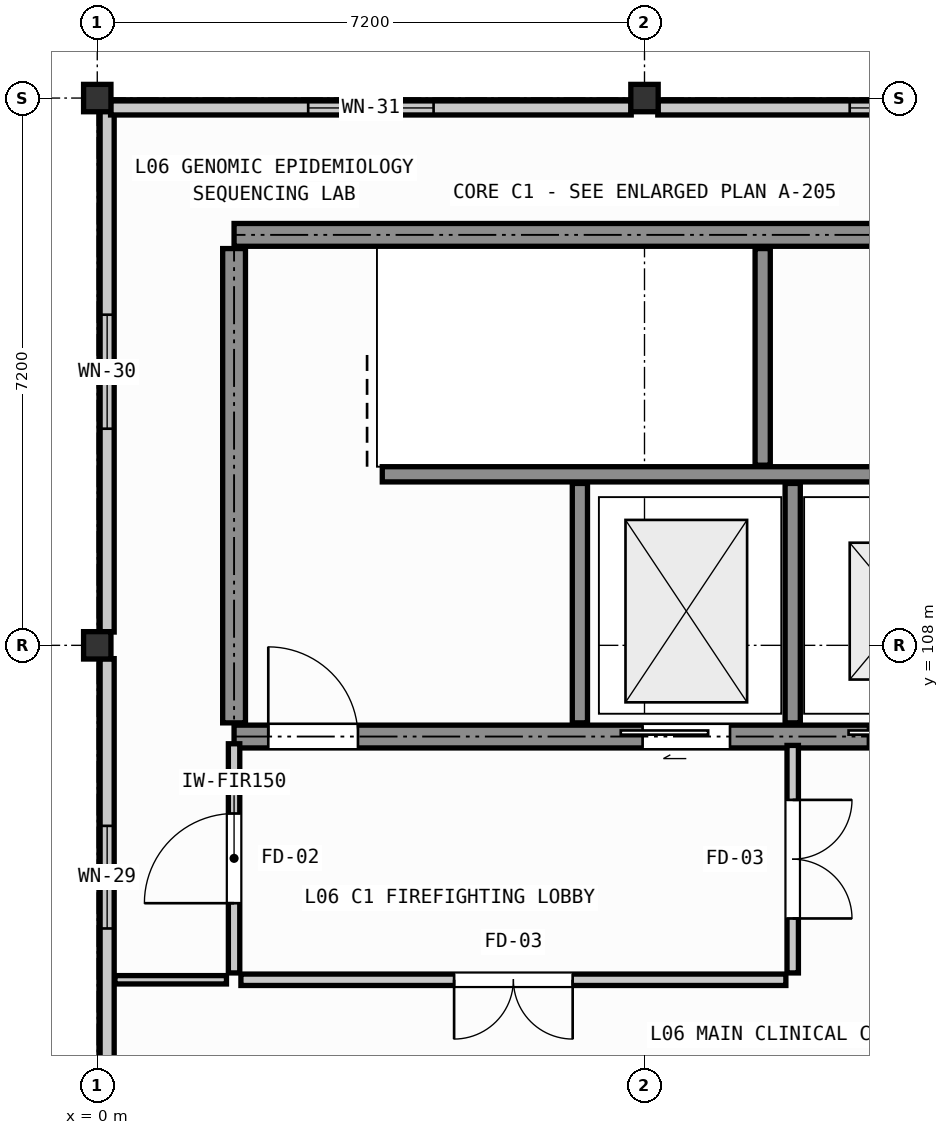
"""IFC4 building model, lengths in metres.
Left out: names, types, materials, properties, quantities, classifications, styles, units other than length and angle.
Written with IfcOpenShell. Run it as: python <this file> out.ifc"""

import sys

from ifc_helpers import new_model, si_unit, direction, frame, frame_2d, origin, origin_2d, place, context, subcontext, project, spatial, rectangle, extrude, element, fill, save


model = new_model("IFC4")
c1 = context("Model", 3, precision=1e-05, world=origin(), true_north=direction((0.0, 1.0)))
c2 = subcontext(c1, "Body", "Model", "MODEL_VIEW")
j1 = project(units=[si_unit("LENGTHUNIT", "METRE"), si_unit("PLANEANGLEUNIT", "RADIAN")], contexts=[c1])
p1 = place(None, origin())
s1 = spatial("IfcSite", under=j1, at=p1, CompositionType="ELEMENT")
p2 = place(p1, origin())
s2 = spatial("IfcBuilding", under=s1, at=p2, CompositionType="ELEMENT")
p3 = place(p2, frame((0.0, 0.0, 21.6)))
s3 = spatial("IfcBuildingStorey", under=s2, at=p3, CompositionType="ELEMENT", Elevation=21.6)
for number, where, z_axis, x_axis in (
    (1, (0.0, 108.0, 0.0), (0.0, 0.0, 1.0), (1.0, 0.0, 0.0)),
    (2, (0.0, 115.2, 0.0), (0.0, 0.0, 1.0), (1.0, 0.0, 0.0)),
    (3, (7.2, 115.2, 0.0), (0.0, 0.0, 1.0), (1.0, 0.0, 0.0)),
):
    element("IfcColumn", number, at=place(p3, frame(where, z_axis=z_axis, x_axis=x_axis)), inside=s3, PredefinedType="COLUMN", context=c2, shape_type="SweptSolid", body=[
        extrude(rectangle(XDim=0.36, YDim=0.36, at=origin_2d()), origin(), (0.0, 0.0, 1.0), 3.69),
    ])
p4 = place(p3, frame((0.13, 100.975, 0.0), z_axis=(0.0, 0.0, 1.0), x_axis=(0.0, 1.0, 0.0)))
e4 = element("IfcWall", 4, at=p4, inside=s3, PredefinedType="SOLIDWALL", context=c2, shape_type="SweptSolid", body=[
    extrude(rectangle(XDim=6.85, YDim=0.185, at=frame_2d((3.425, 0.0))), origin(), (0.0, 0.0, 1.0), 3.05),
])
p5 = place(p4, frame((3.3, 0.0, 0.95)))
e5 = element("IfcOpeningElement", 5, at=p5, cuts=e4, PredefinedType="OPENING", context=c2, shape_type="SweptSolid", body=[
    extrude(rectangle(XDim=1.35, YDim=1.25, at=frame_2d((0.675, 0.625))), frame((0.0, 0.103, 0.0), z_axis=(0.0, -1.0, 0.0), x_axis=(1.0, 0.0, 0.0)), (0.0, 0.0, 1.0), 0.205),
])
p6 = place(p3, frame((0.13, 108.175, 0.0), z_axis=(0.0, 0.0, 1.0), x_axis=(0.0, 1.0, 0.0)))
e6 = element("IfcWall", 6, at=p6, inside=s3, PredefinedType="SOLIDWALL", context=c2, shape_type="SweptSolid", body=[
    extrude(rectangle(XDim=6.85, YDim=0.185, at=frame_2d((3.425, 0.0))), origin(), (0.0, 0.0, 1.0), 3.17),
])
p7 = place(p6, frame((2.675, 0.0, 0.95)))
e7 = element("IfcOpeningElement", 7, at=p7, cuts=e6, PredefinedType="OPENING", context=c2, shape_type="SweptSolid", body=[
    extrude(rectangle(XDim=1.5, YDim=1.25, at=frame_2d((0.75, 0.625))), frame((0.0, 0.103, 0.0), z_axis=(0.0, -1.0, 0.0), x_axis=(1.0, 0.0, 0.0)), (0.0, 0.0, 1.0), 0.205),
])
p8 = place(p3, frame((0.175, 115.07, 0.0), z_axis=(0.0, 0.0, 1.0), x_axis=(1.0, 0.0, 0.0)))
e8 = element("IfcWall", 8, at=p8, inside=s3, PredefinedType="SOLIDWALL", context=c2, shape_type="SweptSolid", body=[
    extrude(rectangle(XDim=6.85, YDim=0.185, at=frame_2d((3.425, 0.0))), origin(), (0.0, 0.0, 1.0), 3.17),
])
p9 = place(p8, frame((2.6, 0.0, 0.95)))
e9 = element("IfcOpeningElement", 9, at=p9, cuts=e8, PredefinedType="OPENING", context=c2, shape_type="SweptSolid", body=[
    extrude(rectangle(XDim=1.65, YDim=1.25, at=frame_2d((0.825, 0.625))), frame((0.0, 0.103, 0.0), z_axis=(0.0, -1.0, 0.0), x_axis=(1.0, 0.0, 0.0)), (0.0, 0.0, 1.0), 0.205),
])
p10 = place(p3, frame((7.375, 115.07, 0.0), z_axis=(0.0, 0.0, 1.0), x_axis=(1.0, 0.0, 0.0)))
e10 = element("IfcWall", 10, at=p10, inside=s3, PredefinedType="SOLIDWALL", context=c2, shape_type="SweptSolid", body=[
    extrude(rectangle(XDim=6.85, YDim=0.185, at=frame_2d((3.425, 0.0))), origin(), (0.0, 0.0, 1.0), 3.13),
])
p11 = place(p10, frame((2.525, 0.0, 0.95)))
e11 = element("IfcOpeningElement", 11, at=p11, cuts=e10, PredefinedType="OPENING", context=c2, shape_type="SweptSolid", body=[
    extrude(rectangle(XDim=1.8, YDim=1.25, at=frame_2d((0.9, 0.625))), frame((0.0, 0.103, 0.0), z_axis=(0.0, -1.0, 0.0), x_axis=(1.0, 0.0, 0.0)), (0.0, 0.0, 1.0), 0.205),
])
p12 = place(p3, frame((1.8, 106.8, 0.0), z_axis=(0.0, 0.0, 1.0), x_axis=(1.0, 0.0, 0.0)))
e12 = element("IfcWall", 12, at=p12, inside=s3, PredefinedType="SHEAR", context=c2, shape_type="SweptSolid", body=[
    extrude(rectangle(XDim=10.8, YDim=0.3, at=frame_2d((5.4, 0.0))), origin(), (0.0, 0.0, 1.0), 3.685),
])
p13 = place(p12, frame((0.45, 0.0, 0.0)))
e13 = element("IfcOpeningElement", 13, at=p13, cuts=e12, PredefinedType="OPENING", context=c2, shape_type="SweptSolid", body=[
    extrude(rectangle(XDim=1.18, YDim=2.16, at=frame_2d((0.59, 1.08))), frame((0.0, 0.16, 0.0), z_axis=(0.0, -1.0, 0.0), x_axis=(1.0, 0.0, 0.0)), (0.0, 0.0, 1.0), 0.32),
])
p14 = place(p12, frame((5.375, 0.0, 0.0)))
e14 = element("IfcOpeningElement", 14, at=p14, cuts=e12, PredefinedType="OPENING", context=c2, shape_type="SweptSolid", body=[
    extrude(rectangle(XDim=1.15, YDim=2.15, at=frame_2d((0.575, 1.075))), frame((0.0, 0.16, 0.0), z_axis=(0.0, -1.0, 0.0), x_axis=(1.0, 0.0, 0.0)), (0.0, 0.0, 1.0), 0.32),
])
p15 = place(p12, frame((8.34, 0.0, 0.0)))
e15 = element("IfcOpeningElement", 15, at=p15, cuts=e12, PredefinedType="OPENING", context=c2, shape_type="SweptSolid", body=[
    extrude(rectangle(XDim=1.02, YDim=2.12, at=frame_2d((0.51, 1.06))), frame((0.0, 0.16, 0.0), z_axis=(0.0, -1.0, 0.0), x_axis=(1.0, 0.0, 0.0)), (0.0, 0.0, 1.0), 0.32),
])
p16 = place(p3, frame((1.8, 113.4, 0.0), z_axis=(0.0, 0.0, 1.0), x_axis=(1.0, 0.0, 0.0)))
e16 = element("IfcWall", 16, at=p16, inside=s3, PredefinedType="SHEAR", context=c2, shape_type="SweptSolid", body=[
    extrude(rectangle(XDim=10.8, YDim=0.3, at=frame_2d((5.4, 0.0))), origin(), (0.0, 0.0, 1.0), 3.685),
])
p17 = place(p3, frame((1.8, 106.98, 0.0), z_axis=(0.0, 0.0, 1.0), x_axis=(0.0, 1.0, 0.0)))
e17 = element("IfcWall", 17, at=p17, inside=s3, PredefinedType="SHEAR", context=c2, shape_type="SweptSolid", body=[
    extrude(rectangle(XDim=6.24, YDim=0.3, at=frame_2d((3.12, 0.0))), origin(), (0.0, 0.0, 1.0), 3.685),
])
p18 = place(p3, frame((3.75, 110.25, 0.0), z_axis=(0.0, 0.0, 1.0), x_axis=(1.0, 0.0, 0.0)))
e18 = element("IfcWall", 18, at=p18, inside=s3, PredefinedType="SHEAR", context=c2, shape_type="SweptSolid", body=[
    extrude(rectangle(XDim=8.67, YDim=0.2, at=frame_2d((4.335, 0.0))), origin(), (0.0, 0.0, 1.0), 3.685),
])
p19 = place(p3, frame((8.755, 110.37, 0.0), z_axis=(0.0, 0.0, 1.0), x_axis=(0.0, 1.0, 0.0)))
e19 = element("IfcWall", 19, at=p19, inside=s3, PredefinedType="SHEAR", context=c2, shape_type="SweptSolid", body=[
    extrude(rectangle(XDim=2.85, YDim=0.2, at=frame_2d((1.425, 0.0))), origin(), (0.0, 0.0, 1.0), 3.685),
])
for number, where, z_axis, x_axis in (
    (20, (6.35, 106.98, 0.0), (0.0, 0.0, 1.0), (0.0, 1.0, 0.0)),
    (21, (9.15, 106.98, 0.0), (0.0, 0.0, 1.0), (0.0, 1.0, 0.0)),
):
    element("IfcWall", number, at=place(p3, frame(where, z_axis=z_axis, x_axis=x_axis)), inside=s3, PredefinedType="SHEAR", context=c2, shape_type="SweptSolid", body=[
        extrude(rectangle(XDim=3.15, YDim=0.2, at=frame_2d((1.575, 0.0))), origin(), (0.0, 0.0, 1.0), 3.685),
    ])
p20 = place(p3, frame((1.8, 103.69, 0.0), z_axis=(0.0, 0.0, 1.0), x_axis=(0.0, 1.0, 0.0)))
e22 = element("IfcWall", 22, at=p20, inside=s3, PredefinedType="PARTITIONING", context=c2, shape_type="SweptSolid", body=[
    extrude(rectangle(XDim=3.015, YDim=0.15, at=frame_2d((1.508, 0.0))), origin(), (0.0, 0.0, 1.0), 3.67),
])
p21 = place(p20, frame((0.917, 0.0, 0.0)))
e23 = element("IfcOpeningElement", 23, at=p21, cuts=e22, PredefinedType="OPENING", context=c2, shape_type="SweptSolid", body=[
    extrude(rectangle(XDim=1.18, YDim=2.16, at=frame_2d((0.59, 1.08))), frame((0.0, 0.085, 0.0), z_axis=(0.0, -1.0, 0.0), x_axis=(1.0, 0.0, 0.0)), (0.0, 0.0, 1.0), 0.17),
])
p22 = place(p3, frame((9.15, 106.683, 0.0), z_axis=(0.0, 0.0, 1.0), x_axis=(0.0, -1.0, 0.0)))
e24 = element("IfcWall", 24, at=p22, inside=s3, PredefinedType="PARTITIONING", context=c2, shape_type="SweptSolid", body=[
    extrude(rectangle(XDim=2.993, YDim=0.15, at=frame_2d((1.497, 0.0))), origin(), (0.0, 0.0, 1.0), 3.67),
])
p23 = place(p22, frame((0.717, 0.0, 0.0)))
e25 = element("IfcOpeningElement", 25, at=p23, cuts=e24, PredefinedType="OPENING", context=c2, shape_type="SweptSolid", body=[
    extrude(rectangle(XDim=1.56, YDim=2.22, at=frame_2d((0.78, 1.11))), frame((0.0, 0.085, 0.0), z_axis=(0.0, -1.0, 0.0), x_axis=(1.0, 0.0, 0.0)), (0.0, 0.0, 1.0), 0.17),
])
p24 = place(p3, frame((9.06, 103.6, 0.0), z_axis=(0.0, 0.0, 1.0), x_axis=(-1.0, 0.0, 0.0)))
e26 = element("IfcWall", 26, at=p24, inside=s3, PredefinedType="PARTITIONING", context=c2, shape_type="SweptSolid", body=[
    extrude(rectangle(XDim=7.17, YDim=0.15, at=frame_2d((3.585, 0.0))), origin(), (0.0, 0.0, 1.0), 3.67),
])
p25 = place(p24, frame((2.805, 0.0, 0.0)))
e27 = element("IfcOpeningElement", 27, at=p25, cuts=e26, PredefinedType="OPENING", context=c2, shape_type="SweptSolid", body=[
    extrude(rectangle(XDim=1.56, YDim=2.22, at=frame_2d((0.78, 1.11))), frame((0.0, 0.085, 0.0), z_axis=(0.0, -1.0, 0.0), x_axis=(1.0, 0.0, 0.0)), (0.0, 0.0, 1.0), 0.17),
])
p26 = place(p3, frame((1.7, 103.6, 0.0), z_axis=(0.0, 0.0, 1.0), x_axis=(-1.0, 0.0, 0.0)))
e28 = element("IfcWall", 28, at=p26, inside=s3, PredefinedType="PARTITIONING", context=c2, shape_type="SweptSolid", body=[
    extrude(rectangle(XDim=1.468, YDim=0.11, at=frame_2d((0.734, 0.0))), origin(), (0.0, 0.0, 1.0), 3.17),
])
p27 = place(p5, origin())
e29 = element("IfcWindow", 29, at=p27, inside=s3, PartitioningType="SINGLE_PANEL", PredefinedType="WINDOW", context=c2, shape_type="SweptSolid", body=[
    extrude(rectangle(XDim=1.35, YDim=1.25, at=frame_2d((0.675, 0.625))), frame((0.0, 0.03, 0.0), z_axis=(0.0, -1.0, 0.0), x_axis=(1.0, 0.0, 0.0)), (0.0, 0.0, 1.0), 0.06),
])
fill(e5, e29)
p28 = place(p7, origin())
e30 = element("IfcWindow", 30, at=p28, inside=s3, PartitioningType="SINGLE_PANEL", PredefinedType="WINDOW", context=c2, shape_type="SweptSolid", body=[
    extrude(rectangle(XDim=1.5, YDim=1.25, at=frame_2d((0.75, 0.625))), frame((0.0, 0.03, 0.0), z_axis=(0.0, -1.0, 0.0), x_axis=(1.0, 0.0, 0.0)), (0.0, 0.0, 1.0), 0.06),
])
fill(e7, e30)
p29 = place(p9, origin())
e31 = element("IfcWindow", 31, at=p29, inside=s3, PartitioningType="SINGLE_PANEL", PredefinedType="WINDOW", context=c2, shape_type="SweptSolid", body=[
    extrude(rectangle(XDim=1.65, YDim=1.25, at=frame_2d((0.825, 0.625))), frame((0.0, 0.03, 0.0), z_axis=(0.0, -1.0, 0.0), x_axis=(1.0, 0.0, 0.0)), (0.0, 0.0, 1.0), 0.06),
])
fill(e9, e31)
p30 = place(p11, origin())
e32 = element("IfcWindow", 32, at=p30, inside=s3, PartitioningType="SINGLE_PANEL", PredefinedType="WINDOW", context=c2, shape_type="SweptSolid", body=[
    extrude(rectangle(XDim=1.8, YDim=1.25, at=frame_2d((0.9, 0.625))), frame((0.0, 0.03, 0.0), z_axis=(0.0, -1.0, 0.0), x_axis=(1.0, 0.0, 0.0)), (0.0, 0.0, 1.0), 0.06),
])
fill(e11, e32)
p31 = place(p13, origin())
e33 = element("IfcDoor", 33, at=p31, inside=s3, OperationType="SINGLE_SWING_LEFT", PredefinedType="DOOR", context=c2, shape_type="SweptSolid", body=[
    extrude(rectangle(XDim=1.18, YDim=2.16, at=frame_2d((0.59, 1.08))), frame((0.0, 0.025, 0.0), z_axis=(0.0, -1.0, 0.0), x_axis=(1.0, 0.0, 0.0)), (0.0, 0.0, 1.0), 0.05),
])
fill(e13, e33)
p32 = place(p14, origin())
e34 = element("IfcDoor", 34, at=p32, inside=s3, OperationType="DOUBLE_DOOR_SLIDING", PredefinedType="DOOR", context=c2, shape_type="SweptSolid", body=[
    extrude(rectangle(XDim=1.15, YDim=2.15, at=frame_2d((0.575, 1.075))), frame((0.0, 0.025, 0.0), z_axis=(0.0, -1.0, 0.0), x_axis=(1.0, 0.0, 0.0)), (0.0, 0.0, 1.0), 0.05),
])
fill(e14, e34)
p33 = place(p15, origin())
e35 = element("IfcDoor", 35, at=p33, inside=s3, OperationType="SLIDING_TO_LEFT", PredefinedType="DOOR", context=c2, shape_type="SweptSolid", body=[
    extrude(rectangle(XDim=1.02, YDim=2.12, at=frame_2d((0.51, 1.06))), frame((0.0, 0.025, 0.0), z_axis=(0.0, -1.0, 0.0), x_axis=(1.0, 0.0, 0.0)), (0.0, 0.0, 1.0), 0.05),
])
fill(e15, e35)
p34 = place(p23, origin())
e36 = element("IfcDoor", 36, at=p34, inside=s3, OperationType="DOUBLE_DOOR_SINGLE_SWING", PredefinedType="DOOR", context=c2, shape_type="SweptSolid", body=[
    extrude(rectangle(XDim=1.56, YDim=2.22, at=frame_2d((0.78, 1.11))), frame((0.0, 0.025, 0.0), z_axis=(0.0, -1.0, 0.0), x_axis=(1.0, 0.0, 0.0)), (0.0, 0.0, 1.0), 0.05),
])
fill(e25, e36)
p35 = place(p25, origin())
e37 = element("IfcDoor", 37, at=p35, inside=s3, OperationType="DOUBLE_DOOR_SINGLE_SWING", PredefinedType="DOOR", context=c2, shape_type="SweptSolid", body=[
    extrude(rectangle(XDim=1.56, YDim=2.22, at=frame_2d((0.78, 1.11))), frame((0.0, 0.025, 0.0), z_axis=(0.0, -1.0, 0.0), x_axis=(1.0, 0.0, 0.0)), (0.0, 0.0, 1.0), 0.05),
])
fill(e27, e37)
p36 = place(p21, origin())
e38 = element("IfcDoor", 38, at=p36, inside=s3, OperationType="SINGLE_SWING_LEFT", PredefinedType="DOOR", context=c2, shape_type="SweptSolid", body=[
    extrude(rectangle(XDim=1.18, YDim=2.16, at=frame_2d((0.59, 1.08))), frame((0.0, 0.025, 0.0), z_axis=(0.0, -1.0, 0.0), x_axis=(1.0, 0.0, 0.0)), (0.0, 0.0, 1.0), 0.05),
])
fill(e23, e38)
save(model, sys.argv[1])
